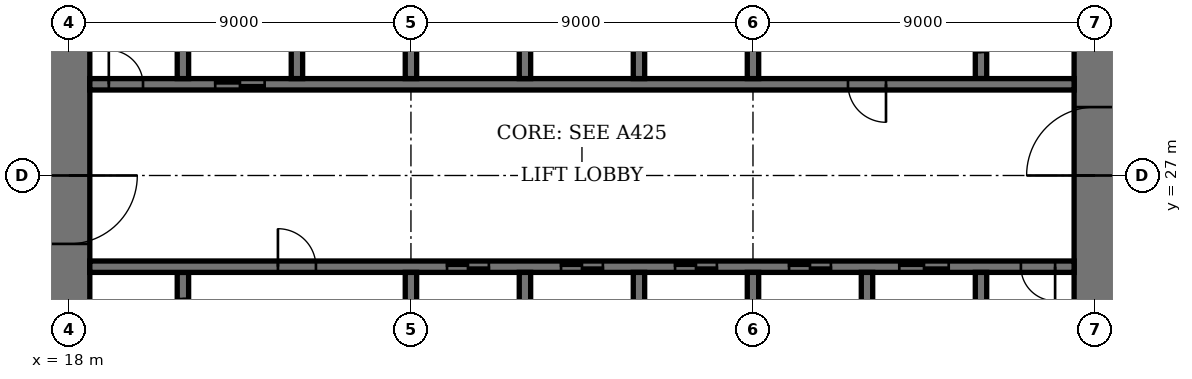
"""IFC4 building model, lengths in metres.
Left out: names, types, materials, properties, quantities, classifications, styles, units other than length and angle.
Written with IfcOpenShell. Run it as: python <this file> out.ifc"""

import sys

from ifc_helpers import new_model, si_unit, direction, frame, frame_2d, origin, place, context, subcontext, project, spatial, rectangle, extrude, element, fill, save


model = new_model("IFC4")
c1 = context("Model", 3, precision=1e-05, world=origin(), true_north=direction((0.0, 1.0)))
c2 = subcontext(c1, "Body", "Model", "MODEL_VIEW")
j1 = project(units=[si_unit("LENGTHUNIT", "METRE"), si_unit("PLANEANGLEUNIT", "RADIAN")], contexts=[c1])
p1 = place(None, origin())
s1 = spatial("IfcSite", under=j1, at=p1, CompositionType="ELEMENT")
p2 = place(p1, origin())
s2 = spatial("IfcBuilding", under=s1, at=p2, CompositionType="ELEMENT")
p3 = place(p2, frame((0.0, 0.0, 71.8)))
s3 = spatial("IfcBuildingStorey", under=s2, at=p3, CompositionType="ELEMENT", Elevation=71.8)
p4 = place(p3, frame((18.0, 35.45, 0.0), z_axis=(0.0, 0.0, 1.0), x_axis=(0.0, -1.0, 0.0)))
e1 = element("IfcWall", 1, at=p4, inside=s3, PredefinedType="SHEAR", context=c2, shape_type="SweptSolid", body=[
    extrude(rectangle(XDim=16.9, YDim=1.1, at=frame_2d((8.45, 0.0))), origin(), (0.0, 0.0, 1.0), 4.0),
])
p5 = place(p4, frame((8.45, 0.0, 0.0)))
e2 = element("IfcOpeningElement", 2, at=p5, cuts=e1, PredefinedType="OPENING", context=c2, shape_type="SweptSolid", body=[
    extrude(rectangle(XDim=1.8, YDim=2.4, at=frame_2d((0.9, 1.2))), frame((0.0, 0.56, 0.0), z_axis=(0.0, -1.0, 0.0), x_axis=(1.0, 0.0, 0.0)), (0.0, 0.0, 1.0), 1.12),
])
p6 = place(p3, frame((45.0, 18.55, 0.0), z_axis=(0.0, 0.0, 1.0), x_axis=(0.0, 1.0, 0.0)))
e3 = element("IfcWall", 3, at=p6, inside=s3, PredefinedType="SHEAR", context=c2, shape_type="SweptSolid", body=[
    extrude(rectangle(XDim=16.9, YDim=1.1, at=frame_2d((8.45, 0.0))), origin(), (0.0, 0.0, 1.0), 4.0),
])
p7 = place(p6, frame((8.45, 0.0, 0.0)))
e4 = element("IfcOpeningElement", 4, at=p7, cuts=e3, PredefinedType="OPENING", context=c2, shape_type="SweptSolid", body=[
    extrude(rectangle(XDim=1.8, YDim=2.4, at=frame_2d((0.9, 1.2))), frame((0.0, 0.56, 0.0), z_axis=(0.0, -1.0, 0.0), x_axis=(1.0, 0.0, 0.0)), (0.0, 0.0, 1.0), 1.12),
])
p8 = place(p3, frame((21.0, 21.95, 0.0), z_axis=(0.0, 0.0, 1.0), x_axis=(0.0, 1.0, 0.0)))
e5 = element("IfcWall", 5, at=p8, inside=s3, PredefinedType="SHEAR", context=c2, shape_type="SweptSolid", body=[
    extrude(rectangle(XDim=2.5, YDim=0.3, at=frame_2d((1.25, 0.0))), origin(), (0.0, 0.0, 1.0), 4.0),
])
p9 = place(p8, frame((0.7, 0.0, 0.0)))
e6 = element("IfcOpeningElement", 6, at=p9, cuts=e5, PredefinedType="OPENING", context=c2, shape_type="SweptSolid", body=[
    extrude(rectangle(XDim=1.1, YDim=2.4, at=frame_2d((0.55, 1.2))), frame((0.0, 0.16, 0.0), z_axis=(0.0, -1.0, 0.0), x_axis=(1.0, 0.0, 0.0)), (0.0, 0.0, 1.0), 0.32),
])
p10 = place(p3, frame((42.0, 29.55, 0.0), z_axis=(0.0, 0.0, 1.0), x_axis=(0.0, 1.0, 0.0)))
e7 = element("IfcWall", 7, at=p10, inside=s3, PredefinedType="SHEAR", context=c2, shape_type="SweptSolid", body=[
    extrude(rectangle(XDim=2.5, YDim=0.3, at=frame_2d((1.25, 0.0))), origin(), (0.0, 0.0, 1.0), 4.0),
])
p11 = place(p10, frame((0.7, 0.0, 0.0)))
e8 = element("IfcOpeningElement", 8, at=p11, cuts=e7, PredefinedType="OPENING", context=c2, shape_type="SweptSolid", body=[
    extrude(rectangle(XDim=1.1, YDim=2.4, at=frame_2d((0.55, 1.2))), frame((0.0, 0.16, 0.0), z_axis=(0.0, -1.0, 0.0), x_axis=(1.0, 0.0, 0.0)), (0.0, 0.0, 1.0), 0.32),
])
p12 = place(p3, frame((18.55, 24.6, 0.0), z_axis=(0.0, 0.0, 1.0), x_axis=(1.0, 0.0, 0.0)))
e9 = element("IfcWall", 9, at=p12, inside=s3, PredefinedType="SHEAR", context=c2, shape_type="SweptSolid", body=[
    extrude(rectangle(XDim=25.9, YDim=0.3, at=frame_2d((12.95, 0.0))), origin(), (0.0, 0.0, 1.0), 4.0),
])
p13 = place(p12, frame((4.95, 0.0, 0.0)))
e10 = element("IfcOpeningElement", 10, at=p13, cuts=e9, PredefinedType="OPENING", context=c2, shape_type="SweptSolid", body=[
    extrude(rectangle(XDim=1.0, YDim=2.4, at=frame_2d((0.5, 1.2))), frame((0.0, 0.16, 0.0), z_axis=(0.0, -1.0, 0.0), x_axis=(1.0, 0.0, 0.0)), (0.0, 0.0, 1.0), 0.32),
])
p14 = place(p12, frame((24.5, 0.0, 0.0)))
e11 = element("IfcOpeningElement", 11, at=p14, cuts=e9, PredefinedType="OPENING", context=c2, shape_type="SweptSolid", body=[
    extrude(rectangle(XDim=0.9, YDim=2.1, at=frame_2d((0.45, 1.05))), frame((0.0, 0.16, 0.0), z_axis=(0.0, -1.0, 0.0), x_axis=(1.0, 0.0, 0.0)), (0.0, 0.0, 1.0), 0.32),
])
p15 = place(p12, frame((9.4, 0.0, 0.0)))
e12 = element("IfcOpeningElement", 12, at=p15, cuts=e9, PredefinedType="OPENING", context=c2, shape_type="SweptSolid", body=[
    extrude(rectangle(XDim=1.1, YDim=2.4, at=frame_2d((0.55, 1.2))), frame((0.0, 0.16, 0.0), z_axis=(0.0, -1.0, 0.0), x_axis=(1.0, 0.0, 0.0)), (0.0, 0.0, 1.0), 0.32),
])
p16 = place(p12, frame((12.4, 0.0, 0.0)))
e13 = element("IfcOpeningElement", 13, at=p16, cuts=e9, PredefinedType="OPENING", context=c2, shape_type="SweptSolid", body=[
    extrude(rectangle(XDim=1.1, YDim=2.4, at=frame_2d((0.55, 1.2))), frame((0.0, 0.16, 0.0), z_axis=(0.0, -1.0, 0.0), x_axis=(1.0, 0.0, 0.0)), (0.0, 0.0, 1.0), 0.32),
])
p17 = place(p12, frame((15.4, 0.0, 0.0)))
e14 = element("IfcOpeningElement", 14, at=p17, cuts=e9, PredefinedType="OPENING", context=c2, shape_type="SweptSolid", body=[
    extrude(rectangle(XDim=1.1, YDim=2.4, at=frame_2d((0.55, 1.2))), frame((0.0, 0.16, 0.0), z_axis=(0.0, -1.0, 0.0), x_axis=(1.0, 0.0, 0.0)), (0.0, 0.0, 1.0), 0.32),
])
p18 = place(p12, frame((18.4, 0.0, 0.0)))
e15 = element("IfcOpeningElement", 15, at=p18, cuts=e9, PredefinedType="OPENING", context=c2, shape_type="SweptSolid", body=[
    extrude(rectangle(XDim=1.1, YDim=2.4, at=frame_2d((0.55, 1.2))), frame((0.0, 0.16, 0.0), z_axis=(0.0, -1.0, 0.0), x_axis=(1.0, 0.0, 0.0)), (0.0, 0.0, 1.0), 0.32),
])
p19 = place(p12, frame((21.3, 0.0, 0.0)))
e16 = element("IfcOpeningElement", 16, at=p19, cuts=e9, PredefinedType="OPENING", context=c2, shape_type="SweptSolid", body=[
    extrude(rectangle(XDim=1.3, YDim=2.4, at=frame_2d((0.65, 1.2))), frame((0.0, 0.16, 0.0), z_axis=(0.0, -1.0, 0.0), x_axis=(1.0, 0.0, 0.0)), (0.0, 0.0, 1.0), 0.32),
])
p20 = place(p3, frame((18.55, 29.4, 0.0), z_axis=(0.0, 0.0, 1.0), x_axis=(1.0, 0.0, 0.0)))
e17 = element("IfcWall", 17, at=p20, inside=s3, PredefinedType="SHEAR", context=c2, shape_type="SweptSolid", body=[
    extrude(rectangle(XDim=25.9, YDim=0.3, at=frame_2d((12.95, 0.0))), origin(), (0.0, 0.0, 1.0), 4.0),
])
p21 = place(p20, frame((19.95, 0.0, 0.0)))
e18 = element("IfcOpeningElement", 18, at=p21, cuts=e17, PredefinedType="OPENING", context=c2, shape_type="SweptSolid", body=[
    extrude(rectangle(XDim=1.0, YDim=2.4, at=frame_2d((0.5, 1.2))), frame((0.0, 0.16, 0.0), z_axis=(0.0, -1.0, 0.0), x_axis=(1.0, 0.0, 0.0)), (0.0, 0.0, 1.0), 0.32),
])
p22 = place(p20, frame((0.5, 0.0, 0.0)))
e19 = element("IfcOpeningElement", 19, at=p22, cuts=e17, PredefinedType="OPENING", context=c2, shape_type="SweptSolid", body=[
    extrude(rectangle(XDim=0.9, YDim=2.1, at=frame_2d((0.45, 1.05))), frame((0.0, 0.16, 0.0), z_axis=(0.0, -1.0, 0.0), x_axis=(1.0, 0.0, 0.0)), (0.0, 0.0, 1.0), 0.32),
])
p23 = place(p20, frame((3.3, 0.0, 0.0)))
e20 = element("IfcOpeningElement", 20, at=p23, cuts=e17, PredefinedType="OPENING", context=c2, shape_type="SweptSolid", body=[
    extrude(rectangle(XDim=1.3, YDim=2.4, at=frame_2d((0.65, 1.2))), frame((0.0, 0.16, 0.0), z_axis=(0.0, -1.0, 0.0), x_axis=(1.0, 0.0, 0.0)), (0.0, 0.0, 1.0), 0.32),
])
for number, where, z_axis, x_axis in (
    (21, (30.0, 21.75, 0.0), (0.0, 0.0, 1.0), (0.0, 1.0, 0.0)),
    (22, (33.0, 29.55, 0.0), (0.0, 0.0, 1.0), (0.0, 1.0, 0.0)),
    (23, (33.0, 21.75, 0.0), (0.0, 0.0, 1.0), (0.0, 1.0, 0.0)),
    (24, (30.0, 29.55, 0.0), (0.0, 0.0, 1.0), (0.0, 1.0, 0.0)),
    (25, (36.0, 21.75, 0.0), (0.0, 0.0, 1.0), (0.0, 1.0, 0.0)),
    (26, (27.0, 29.55, 0.0), (0.0, 0.0, 1.0), (0.0, 1.0, 0.0)),
):
    element("IfcWall", number, at=place(p3, frame(where, z_axis=z_axis, x_axis=x_axis)), inside=s3, PredefinedType="SHEAR", context=c2, shape_type="SweptSolid", body=[
        extrude(rectangle(XDim=2.7, YDim=0.3, at=frame_2d((1.35, 0.0))), origin(), (0.0, 0.0, 1.0), 4.0),
    ])
for number, where, z_axis, x_axis in (
    (27, (39.0, 18.55, 0.0), (0.0, 0.0, 1.0), (0.0, 1.0, 0.0)),
    (28, (24.0, 29.55, 0.0), (0.0, 0.0, 1.0), (0.0, 1.0, 0.0)),
):
    element("IfcWall", number, at=place(p3, frame(where, z_axis=z_axis, x_axis=x_axis)), inside=s3, PredefinedType="SHEAR", context=c2, shape_type="SweptSolid", body=[
        extrude(rectangle(XDim=5.9, YDim=0.3, at=frame_2d((2.95, 0.0))), origin(), (0.0, 0.0, 1.0), 4.0),
    ])
for number, where, z_axis, x_axis in (
    (29, (42.0, 21.75, 0.0), (0.0, 0.0, 1.0), (0.0, 1.0, 0.0)),
    (30, (21.0, 29.55, 0.0), (0.0, 0.0, 1.0), (0.0, 1.0, 0.0)),
):
    element("IfcWall", number, at=place(p3, frame(where, z_axis=z_axis, x_axis=x_axis)), inside=s3, PredefinedType="SHEAR", context=c2, shape_type="SweptSolid", body=[
        extrude(rectangle(XDim=2.7, YDim=0.3, at=frame_2d((1.35, 0.0))), origin(), (0.0, 0.0, 1.0), 4.0),
    ])
for number, where, z_axis, x_axis in (
    (31, (27.0, 21.6, 0.0), (0.0, 0.0, 1.0), (0.0, 1.0, 0.0)),
    (32, (36.0, 29.55, 0.0), (0.0, 0.0, 1.0), (0.0, 1.0, 0.0)),
):
    element("IfcWall", number, at=place(p3, frame(where, z_axis=z_axis, x_axis=x_axis)), inside=s3, PredefinedType="SHEAR", context=c2, shape_type="SweptSolid", body=[
        extrude(rectangle(XDim=2.85, YDim=0.3, at=frame_2d((1.425, 0.0))), origin(), (0.0, 0.0, 1.0), 4.0),
    ])
p24 = place(p5, origin())
e33 = element("IfcDoor", 33, at=p24, inside=s3, OperationType="DOUBLE_DOOR_DOUBLE_SWING", PredefinedType="DOOR", context=c2, shape_type="SweptSolid", body=[
    extrude(rectangle(XDim=1.8, YDim=2.4, at=frame_2d((0.9, 1.2))), frame((0.0, 0.03, 0.0), z_axis=(0.0, -1.0, 0.0), x_axis=(1.0, 0.0, 0.0)), (0.0, 0.0, 1.0), 0.06),
    extrude(rectangle(XDim=0.04, YDim=2.4, at=frame_2d((0.02, 1.2))), frame((0.0, 0.55, 0.0), z_axis=(0.0, -1.0, 0.0), x_axis=(1.0, 0.0, 0.0)), (0.0, 0.0, 1.0), 1.1),
    extrude(rectangle(XDim=0.04, YDim=2.4, at=frame_2d((1.78, 1.2))), frame((0.0, 0.55, 0.0), z_axis=(0.0, -1.0, 0.0), x_axis=(1.0, 0.0, 0.0)), (0.0, 0.0, 1.0), 1.1),
    extrude(rectangle(XDim=1.8, YDim=0.04, at=frame_2d((0.9, 2.38))), frame((0.0, 0.55, 0.0), z_axis=(0.0, -1.0, 0.0), x_axis=(1.0, 0.0, 0.0)), (0.0, 0.0, 1.0), 1.1),
])
fill(e2, e33)
p25 = place(p7, origin())
e34 = element("IfcDoor", 34, at=p25, inside=s3, OperationType="DOUBLE_DOOR_DOUBLE_SWING", PredefinedType="DOOR", context=c2, shape_type="SweptSolid", body=[
    extrude(rectangle(XDim=1.8, YDim=2.4, at=frame_2d((0.9, 1.2))), frame((0.0, 0.03, 0.0), z_axis=(0.0, -1.0, 0.0), x_axis=(1.0, 0.0, 0.0)), (0.0, 0.0, 1.0), 0.06),
    extrude(rectangle(XDim=0.04, YDim=2.4, at=frame_2d((0.02, 1.2))), frame((0.0, 0.55, 0.0), z_axis=(0.0, -1.0, 0.0), x_axis=(1.0, 0.0, 0.0)), (0.0, 0.0, 1.0), 1.1),
    extrude(rectangle(XDim=0.04, YDim=2.4, at=frame_2d((1.78, 1.2))), frame((0.0, 0.55, 0.0), z_axis=(0.0, -1.0, 0.0), x_axis=(1.0, 0.0, 0.0)), (0.0, 0.0, 1.0), 1.1),
    extrude(rectangle(XDim=1.8, YDim=0.04, at=frame_2d((0.9, 2.38))), frame((0.0, 0.55, 0.0), z_axis=(0.0, -1.0, 0.0), x_axis=(1.0, 0.0, 0.0)), (0.0, 0.0, 1.0), 1.1),
])
fill(e4, e34)
p26 = place(p13, origin())
e35 = element("IfcDoor", 35, at=p26, inside=s3, OperationType="SINGLE_SWING_RIGHT", PredefinedType="DOOR", context=c2, shape_type="SweptSolid", body=[
    extrude(rectangle(XDim=1.0, YDim=2.4, at=frame_2d((0.5, 1.2))), frame((0.0, 0.03, 0.0), z_axis=(0.0, -1.0, 0.0), x_axis=(1.0, 0.0, 0.0)), (0.0, 0.0, 1.0), 0.06),
])
fill(e10, e35)
p27 = place(p21, origin())
e36 = element("IfcDoor", 36, at=p27, inside=s3, OperationType="SINGLE_SWING_RIGHT", PredefinedType="DOOR", context=c2, shape_type="SweptSolid", body=[
    extrude(rectangle(XDim=1.0, YDim=2.4, at=frame_2d((0.5, 1.2))), frame((0.0, 0.03, 0.0), z_axis=(0.0, -1.0, 0.0), x_axis=(1.0, 0.0, 0.0)), (0.0, 0.0, 1.0), 0.06),
])
fill(e18, e36)
p28 = place(p14, origin())
e37 = element("IfcDoor", 37, at=p28, inside=s3, OperationType="SINGLE_SWING_RIGHT", PredefinedType="DOOR", context=c2, shape_type="SweptSolid", body=[
    extrude(rectangle(XDim=0.9, YDim=2.1, at=frame_2d((0.45, 1.05))), frame((0.0, 0.03, 0.0), z_axis=(0.0, -1.0, 0.0), x_axis=(1.0, 0.0, 0.0)), (0.0, 0.0, 1.0), 0.06),
])
fill(e11, e37)
p29 = place(p22, origin())
e38 = element("IfcDoor", 38, at=p29, inside=s3, OperationType="SINGLE_SWING_RIGHT", PredefinedType="DOOR", context=c2, shape_type="SweptSolid", body=[
    extrude(rectangle(XDim=0.9, YDim=2.1, at=frame_2d((0.45, 1.05))), frame((0.0, 0.03, 0.0), z_axis=(0.0, -1.0, 0.0), x_axis=(1.0, 0.0, 0.0)), (0.0, 0.0, 1.0), 0.06),
])
fill(e19, e38)
p30 = place(p15, origin())
e39 = element("IfcDoor", 39, at=p30, inside=s3, OperationType="DOUBLE_DOOR_SLIDING", PredefinedType="DOOR", context=c2, shape_type="SweptSolid", body=[
    extrude(rectangle(XDim=1.1, YDim=2.4, at=frame_2d((0.55, 1.2))), frame((0.0, 0.02, 0.0), z_axis=(0.0, -1.0, 0.0), x_axis=(1.0, 0.0, 0.0)), (0.0, 0.0, 1.0), 0.04),
])
fill(e12, e39)
p31 = place(p16, origin())
e40 = element("IfcDoor", 40, at=p31, inside=s3, OperationType="DOUBLE_DOOR_SLIDING", PredefinedType="DOOR", context=c2, shape_type="SweptSolid", body=[
    extrude(rectangle(XDim=1.1, YDim=2.4, at=frame_2d((0.55, 1.2))), frame((0.0, 0.02, 0.0), z_axis=(0.0, -1.0, 0.0), x_axis=(1.0, 0.0, 0.0)), (0.0, 0.0, 1.0), 0.04),
])
fill(e13, e40)
p32 = place(p17, origin())
e41 = element("IfcDoor", 41, at=p32, inside=s3, OperationType="DOUBLE_DOOR_SLIDING", PredefinedType="DOOR", context=c2, shape_type="SweptSolid", body=[
    extrude(rectangle(XDim=1.1, YDim=2.4, at=frame_2d((0.55, 1.2))), frame((0.0, 0.02, 0.0), z_axis=(0.0, -1.0, 0.0), x_axis=(1.0, 0.0, 0.0)), (0.0, 0.0, 1.0), 0.04),
])
fill(e14, e41)
p33 = place(p18, origin())
e42 = element("IfcDoor", 42, at=p33, inside=s3, OperationType="DOUBLE_DOOR_SLIDING", PredefinedType="DOOR", context=c2, shape_type="SweptSolid", body=[
    extrude(rectangle(XDim=1.1, YDim=2.4, at=frame_2d((0.55, 1.2))), frame((0.0, 0.02, 0.0), z_axis=(0.0, -1.0, 0.0), x_axis=(1.0, 0.0, 0.0)), (0.0, 0.0, 1.0), 0.04),
])
fill(e15, e42)
p34 = place(p19, origin())
e43 = element("IfcDoor", 43, at=p34, inside=s3, OperationType="DOUBLE_DOOR_SLIDING", PredefinedType="DOOR", context=c2, shape_type="SweptSolid", body=[
    extrude(rectangle(XDim=1.3, YDim=2.4, at=frame_2d((0.65, 1.2))), frame((0.0, 0.02, 0.0), z_axis=(0.0, -1.0, 0.0), x_axis=(1.0, 0.0, 0.0)), (0.0, 0.0, 1.0), 0.04),
])
fill(e16, e43)
p35 = place(p23, origin())
e44 = element("IfcDoor", 44, at=p35, inside=s3, OperationType="DOUBLE_DOOR_SLIDING", PredefinedType="DOOR", context=c2, shape_type="SweptSolid", body=[
    extrude(rectangle(XDim=1.3, YDim=2.4, at=frame_2d((0.65, 1.2))), frame((0.0, 0.02, 0.0), z_axis=(0.0, -1.0, 0.0), x_axis=(1.0, 0.0, 0.0)), (0.0, 0.0, 1.0), 0.04),
])
fill(e20, e44)
save(model, sys.argv[1])
